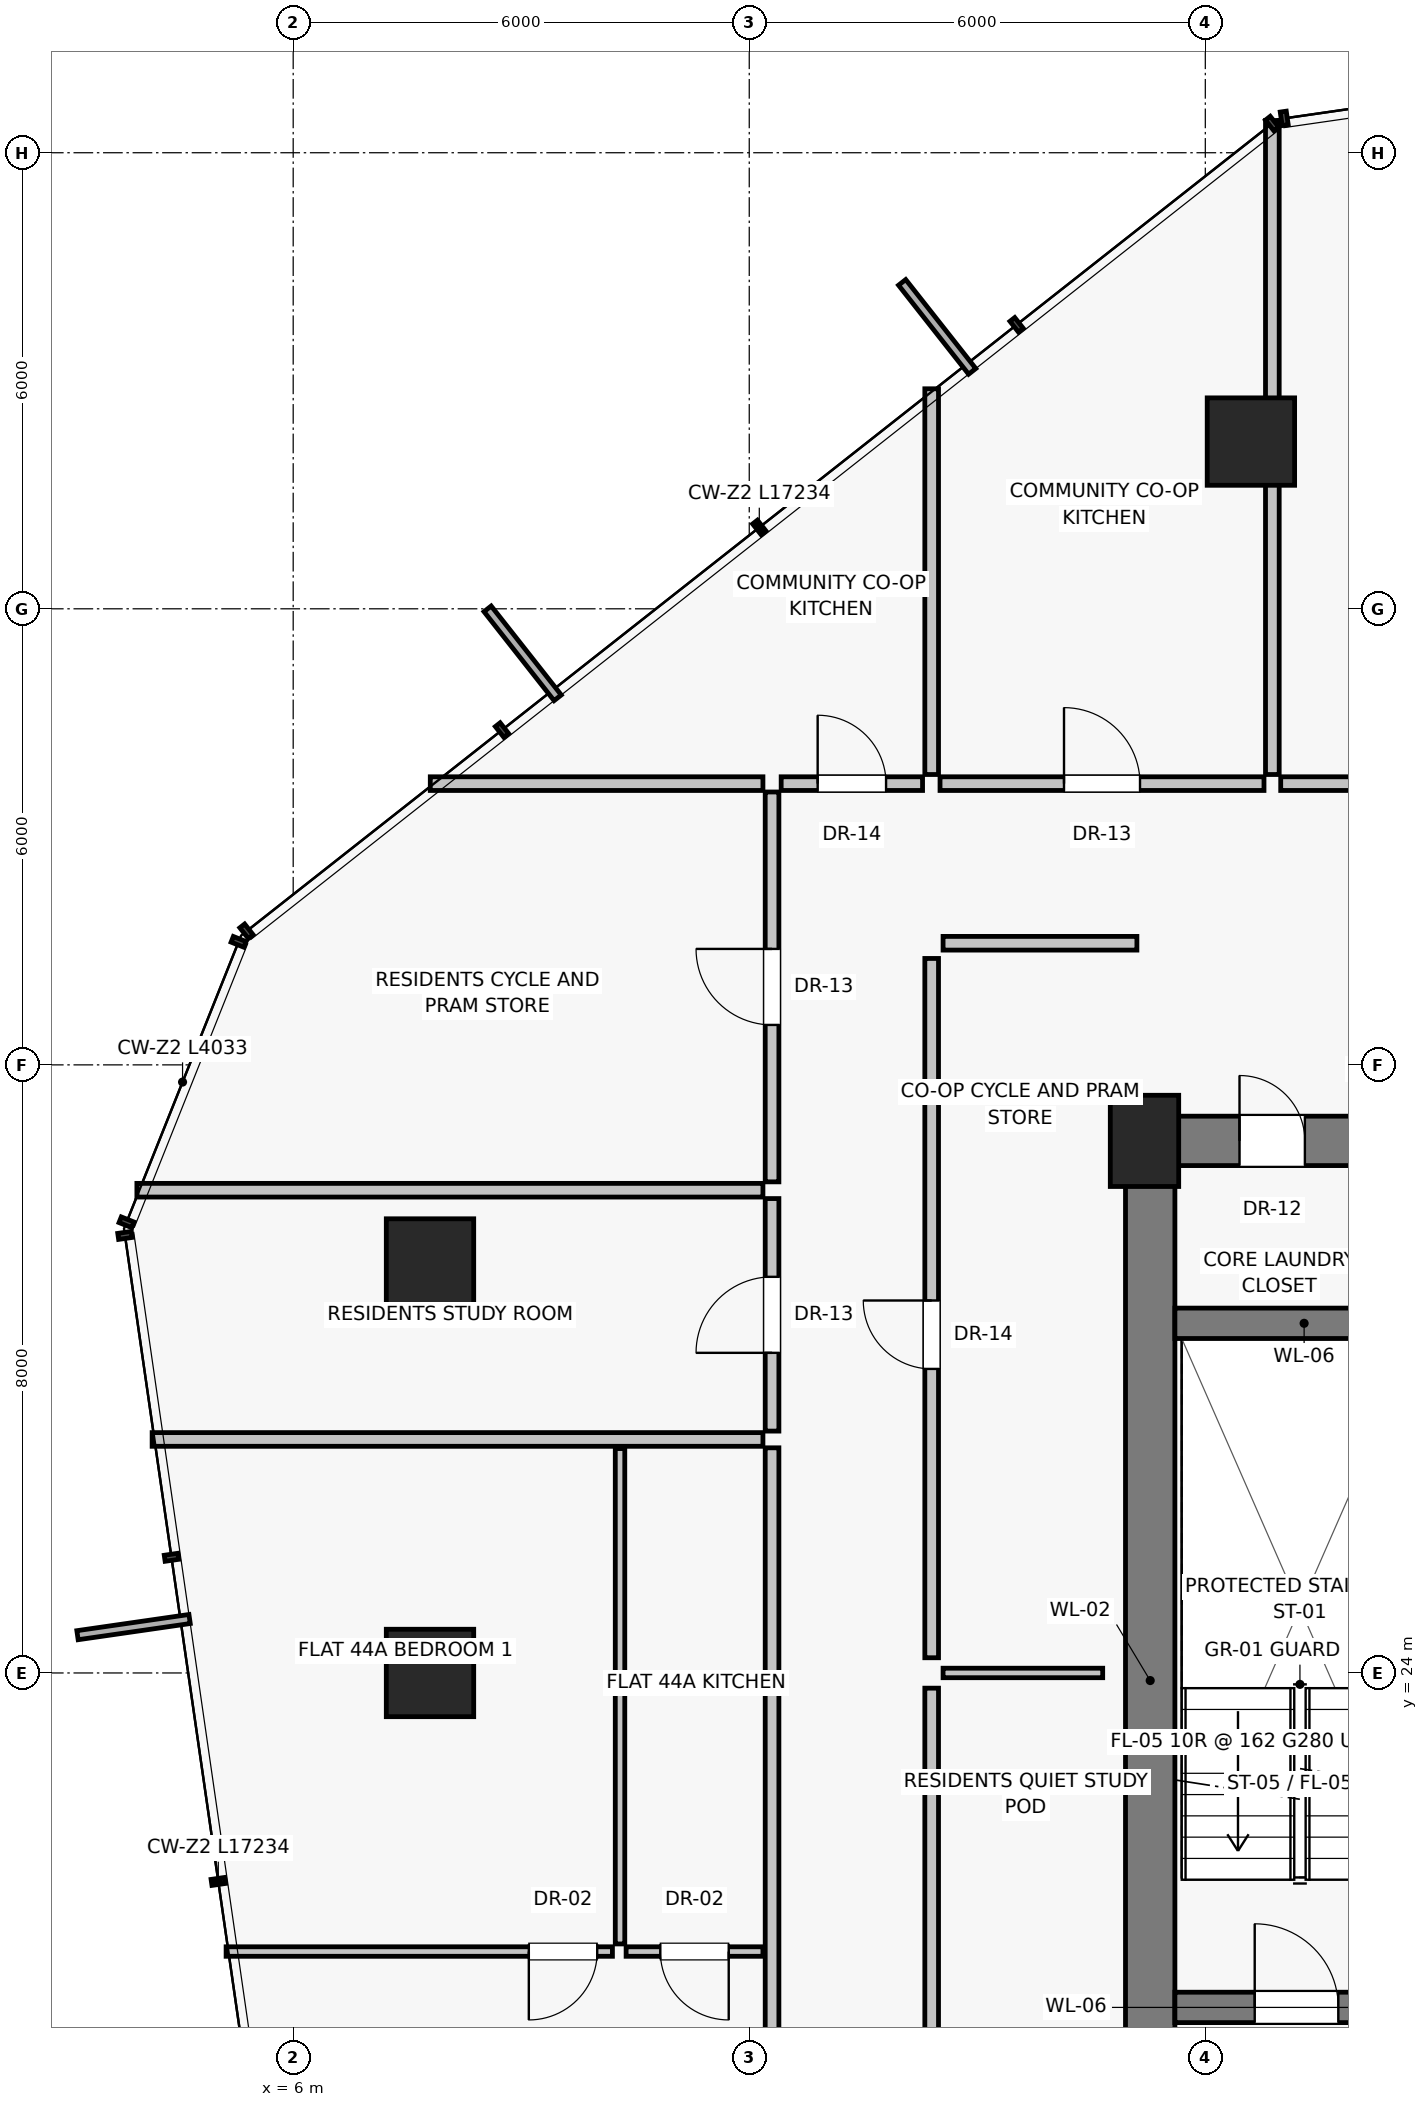
"""IFC4 building model, lengths in metres.
Left out: names, types, materials, properties, quantities, classifications, styles, units other than length and angle.
Written with IfcOpenShell. Run it as: python <this file> out.ifc"""

import sys

from ifc_helpers import new_model, si_unit, direction, frame, frame_2d, origin, origin_2d, place, context, subcontext, project, spatial, rectangle, extrude, source, transform, mapped, element, fill, save


model = new_model("IFC4")
c1 = context("Model", 3, precision=1e-05, world=origin(), true_north=direction((0.0, 1.0)))
c2 = subcontext(c1, "Body", "Model", "MODEL_VIEW")
j1 = project(units=[si_unit("LENGTHUNIT", "METRE"), si_unit("PLANEANGLEUNIT", "RADIAN")], contexts=[c1])
p1 = place(None, origin())
s1 = spatial("IfcSite", under=j1, at=p1, CompositionType="ELEMENT")
p2 = place(p1, origin())
s2 = spatial("IfcBuilding", under=s1, at=p2, CompositionType="ELEMENT")
p3 = place(p2, frame((0.0, 0.0, 155.5)))
s3 = spatial("IfcBuildingStorey", under=s2, at=p3, CompositionType="ELEMENT", Elevation=155.5)
p4 = place(p3, frame((17.2, 31.0, 0.0), z_axis=(0.0, 0.0, 1.0), x_axis=(1.0, 0.0, 0.0)))
e1 = element("IfcColumn", 1, at=p4, inside=s3, PredefinedType="PILASTER", context=c2, shape_type="SweptSolid", body=[
    extrude(rectangle(XDim=0.9, YDim=1.2, at=origin_2d()), origin(), (0.0, 0.0, 1.0), 3.25),
])
for number, where, z_axis, x_axis in (
    (2, (18.6, 40.2, 0.0), (0.0, 0.0, 1.0), (1.0, 0.0, 0.0)),
    (3, (7.8, 29.4, 0.0), (0.0, 0.0, 1.0), (1.0, 0.0, 0.0)),
    (4, (7.8, 24.0, 0.0), (0.0, 0.0, 1.0), (1.0, 0.0, 0.0)),
):
    element("IfcColumn", number, at=place(p3, frame(where, z_axis=z_axis, x_axis=x_axis)), inside=s3, PredefinedType="COLUMN", context=c2, shape_type="SweptSolid", body=[
        extrude(rectangle(XDim=1.15, YDim=1.15, at=origin_2d()), origin(), (0.0, 0.0, 1.0), 3.25),
    ])
p5 = place(p3, frame((17.275, 16.8, 0.0), z_axis=(0.0, 0.0, 1.0), x_axis=(0.0, 1.0, 0.0)))
e5 = element("IfcWall", 5, at=p5, inside=s3, PredefinedType="SHEAR", context=c2, shape_type="SweptSolid", body=[
    extrude(rectangle(XDim=14.2, YDim=0.65, at=frame_2d((7.1, 0.0))), origin(), (0.0, 0.0, 1.0), 2.97),
])
p6 = place(p3, frame((17.2, 31.0, 0.0), z_axis=(0.0, 0.0, 1.0), x_axis=(1.0, 0.0, 0.0)))
e6 = element("IfcWall", 6, at=p6, inside=s3, PredefinedType="SHEAR", context=c2, shape_type="SweptSolid", body=[
    extrude(rectangle(XDim=3.8, YDim=0.65, at=frame_2d((1.9, 0.0))), origin(), (0.0, 0.0, 1.0), 2.97),
])
p7 = place(p6, frame((1.25, 0.0, 0.0)))
e7 = element("IfcOpeningElement", 7, at=p7, cuts=e6, PredefinedType="OPENING", context=c2, shape_type="SweptSolid", body=[
    extrude(rectangle(XDim=0.86, YDim=2.01, at=frame_2d((0.43, 1.005))), frame((0.0, 0.335, 0.0), z_axis=(0.0, -1.0, 0.0), x_axis=(1.0, 0.0, 0.0)), (0.0, 0.0, 1.0), 0.67),
])
p8 = place(p3, frame((17.6, 19.6, 0.0), z_axis=(0.0, 0.0, 1.0), x_axis=(1.0, 0.0, 0.0)))
e8 = element("IfcWall", 8, at=p8, inside=s3, PredefinedType="SHEAR", context=c2, shape_type="SweptSolid", body=[
    extrude(rectangle(XDim=3.4, YDim=0.4, at=frame_2d((1.7, 0.0))), origin(), (0.0, 0.0, 1.0), 2.97),
])
p9 = place(p8, frame((1.05, 0.0, 0.0)))
e9 = element("IfcOpeningElement", 9, at=p9, cuts=e8, PredefinedType="OPENING", context=c2, shape_type="SweptSolid", body=[
    extrude(rectangle(XDim=1.1, YDim=2.03, at=frame_2d((0.55, 1.015))), frame((0.0, 0.21, 0.0), z_axis=(0.0, -1.0, 0.0), x_axis=(1.0, 0.0, 0.0)), (0.0, 0.0, 1.0), 0.42),
])
p10 = place(p3, frame((17.6, 28.6, 0.0), z_axis=(0.0, 0.0, 1.0), x_axis=(1.0, 0.0, 0.0)))
e10 = element("IfcWall", 10, at=p10, inside=s3, PredefinedType="SHEAR", context=c2, shape_type="SweptSolid", body=[
    extrude(rectangle(XDim=3.4, YDim=0.4, at=frame_2d((1.7, 0.0))), origin(), (0.0, 0.0, 1.0), 2.97),
])
p11 = place(p3, frame((14.4, 14.4, 0.0), z_axis=(0.0, 0.0, 1.0), x_axis=(0.0, 1.0, 0.0)))
e11 = element("IfcWall", 11, at=p11, inside=s3, PredefinedType="PARTITIONING", context=c2, shape_type="SweptSolid", body=[
    extrude(rectangle(XDim=9.4, YDim=0.18, at=frame_2d((4.7, 0.0))), origin(), (0.0, 0.0, 1.0), 2.97),
])
p12 = place(p11, frame((3.8, 0.0, 0.0)))
e12 = element("IfcOpeningElement", 12, at=p12, cuts=e11, PredefinedType="OPENING", context=c2, shape_type="SweptSolid", body=[
    extrude(rectangle(XDim=0.9, YDim=2.01, at=frame_2d((0.45, 1.005))), frame((0.0, 0.1, 0.0), z_axis=(0.0, -1.0, 0.0), x_axis=(1.0, 0.0, 0.0)), (0.0, 0.0, 1.0), 0.2),
])
p13 = place(p3, frame((14.4, 24.2, 0.0), z_axis=(0.0, 0.0, 1.0), x_axis=(0.0, 1.0, 0.0)))
e13 = element("IfcWall", 13, at=p13, inside=s3, PredefinedType="PARTITIONING", context=c2, shape_type="SweptSolid", body=[
    extrude(rectangle(XDim=9.2, YDim=0.18, at=frame_2d((4.6, 0.0))), origin(), (0.0, 0.0, 1.0), 2.97),
])
p14 = place(p13, frame((3.8, 0.0, 0.0)))
e14 = element("IfcOpeningElement", 14, at=p14, cuts=e13, PredefinedType="OPENING", context=c2, shape_type="SweptSolid", body=[
    extrude(rectangle(XDim=0.9, YDim=2.01, at=frame_2d((0.45, 1.005))), frame((0.0, 0.1, 0.0), z_axis=(0.0, -1.0, 0.0), x_axis=(1.0, 0.0, 0.0)), (0.0, 0.0, 1.0), 0.2),
])
p15 = place(p3, frame((14.55, 24.0, 0.0), z_axis=(0.0, 0.0, 1.0), x_axis=(1.0, 0.0, 0.0)))
e15 = element("IfcWall", 15, at=p15, inside=s3, PredefinedType="PARTITIONING", context=c2, shape_type="SweptSolid", body=[
    extrude(rectangle(XDim=2.1, YDim=0.125, at=frame_2d((1.05, 0.0))), origin(), (0.0, 0.0, 1.0), 2.97),
])
p16 = place(p3, frame((14.55, 33.6, 0.0), z_axis=(0.0, 0.0, 1.0), x_axis=(1.0, 0.0, 0.0)))
e16 = element("IfcWall", 16, at=p16, inside=s3, PredefinedType="PARTITIONING", context=c2, shape_type="SweptSolid", body=[
    extrude(rectangle(XDim=2.55, YDim=0.18, at=frame_2d((1.275, 0.0))), origin(), (0.0, 0.0, 1.0), 2.97),
])
p17 = place(p3, frame((14.4, 35.82, 0.0), z_axis=(0.0, 0.0, 1.0), x_axis=(0.0, 1.0, 0.0)))
e17 = element("IfcWall", 17, at=p17, inside=s3, PredefinedType="PARTITIONING", context=c2, shape_type="SweptSolid", body=[
    extrude(rectangle(XDim=5.074, YDim=0.18, at=frame_2d((2.537, 0.0))), origin(), (0.0, 0.0, 1.0), 2.97),
])
p18 = place(p3, frame((14.51, 35.7, 0.0), z_axis=(0.0, 0.0, 1.0), x_axis=(1.0, 0.0, 0.0)))
e18 = element("IfcWall", 18, at=p18, inside=s3, PredefinedType="PARTITIONING", context=c2, shape_type="SweptSolid", body=[
    extrude(rectangle(XDim=4.262, YDim=0.18, at=frame_2d((2.131, 0.0))), origin(), (0.0, 0.0, 1.0), 2.55),
])
p19 = place(p18, frame((1.631, 0.0, 0.0)))
e19 = element("IfcOpeningElement", 19, at=p19, cuts=e18, PredefinedType="OPENING", context=c2, shape_type="SweptSolid", body=[
    extrude(rectangle(XDim=1.0, YDim=2.01, at=frame_2d((0.5, 1.005))), frame((0.0, 0.1, 0.0), z_axis=(0.0, -1.0, 0.0), x_axis=(1.0, 0.0, 0.0)), (0.0, 0.0, 1.0), 0.2),
])
p20 = place(p3, frame((18.992, 35.7, 0.0), z_axis=(0.0, 0.0, 1.0), x_axis=(1.0, 0.0, 0.0)))
e20 = element("IfcWall", 20, at=p20, inside=s3, PredefinedType="PARTITIONING", context=c2, shape_type="SweptSolid", body=[
    extrude(rectangle(XDim=7.092, YDim=0.18, at=frame_2d((3.546, 0.0))), origin(), (0.0, 0.0, 1.0), 2.55),
])
p21 = place(p20, frame((3.046, 0.0, 0.0)))
e21 = element("IfcOpeningElement", 21, at=p21, cuts=e20, PredefinedType="OPENING", context=c2, shape_type="SweptSolid", body=[
    extrude(rectangle(XDim=1.0, YDim=2.01, at=frame_2d((0.5, 1.005))), frame((0.0, 0.1, 0.0), z_axis=(0.0, -1.0, 0.0), x_axis=(1.0, 0.0, 0.0)), (0.0, 0.0, 1.0), 0.2),
])
p22 = place(p3, frame((18.882, 35.82, 0.0), z_axis=(0.0, 0.0, 1.0), x_axis=(0.0, 1.0, 0.0)))
e22 = element("IfcWall", 22, at=p22, inside=s3, PredefinedType="PARTITIONING", context=c2, shape_type="SweptSolid", body=[
    extrude(rectangle(XDim=8.604, YDim=0.18, at=frame_2d((4.302, 0.0))), origin(), (0.0, 0.0, 1.0), 2.348),
])
p23 = place(p3, frame((12.18, 35.7, 0.0), z_axis=(0.0, 0.0, 1.0), x_axis=(-1.0, 0.0, 0.0)))
e23 = element("IfcWall", 23, at=p23, inside=s3, PredefinedType="PARTITIONING", context=c2, shape_type="SweptSolid", body=[
    extrude(rectangle(XDim=4.376, YDim=0.18, at=frame_2d((2.188, 0.0))), origin(), (0.0, 0.0, 1.0), 2.97),
])
p24 = place(p3, frame((12.3, 12.21, 0.0), z_axis=(0.0, 0.0, 1.0), x_axis=(0.0, 1.0, 0.0)))
e24 = element("IfcWall", 24, at=p24, inside=s3, PredefinedType="PARTITIONING", context=c2, shape_type="SweptSolid", body=[
    extrude(rectangle(XDim=14.752, YDim=0.18, at=frame_2d((7.376, 0.0))), origin(), (0.0, 0.0, 1.0), 2.55),
])
p25 = place(p24, frame((4.657, 0.0, 0.0)))
e25 = element("IfcOpeningElement", 25, at=p25, cuts=e24, PredefinedType="OPENING", context=c2, shape_type="SweptSolid", body=[
    extrude(rectangle(XDim=0.95, YDim=2.02, at=frame_2d((0.475, 1.01))), frame((0.0, 0.1, 0.0), z_axis=(0.0, -1.0, 0.0), x_axis=(1.0, 0.0, 0.0)), (0.0, 0.0, 1.0), 0.2),
])
p26 = place(p3, frame((12.18, 20.335, 0.0), z_axis=(0.0, 0.0, 1.0), x_axis=(-1.0, 0.0, 0.0)))
e26 = element("IfcWall", 26, at=p26, inside=s3, PredefinedType="PARTITIONING", context=c2, shape_type="SweptSolid", body=[
    extrude(rectangle(XDim=1.8, YDim=0.125, at=frame_2d((0.9, 0.0))), origin(), (0.0, 0.0, 1.0), 2.97),
])
p27 = place(p26, frame((0.45, 0.0, 0.0)))
e27 = element("IfcOpeningElement", 27, at=p27, cuts=e26, PredefinedType="OPENING", context=c2, shape_type="SweptSolid", body=[
    extrude(rectangle(XDim=0.9, YDim=2.01, at=frame_2d((0.45, 1.005))), frame((0.0, 0.073, 0.0), z_axis=(0.0, -1.0, 0.0), x_axis=(1.0, 0.0, 0.0)), (0.0, 0.0, 1.0), 0.145),
])
p28 = place(p3, frame((10.3, 20.435, 0.0), z_axis=(0.0, 0.0, 1.0), x_axis=(0.0, 1.0, 0.0)))
e28 = element("IfcWall", 28, at=p28, inside=s3, PredefinedType="PARTITIONING", context=c2, shape_type="SweptSolid", body=[
    extrude(rectangle(XDim=6.517, YDim=0.125, at=frame_2d((3.258, 0.0))), origin(), (0.0, 0.0, 1.0), 2.97),
])
p29 = place(p3, frame((10.2, 20.335, 0.0), z_axis=(0.0, 0.0, 1.0), x_axis=(-1.0, 0.0, 0.0)))
e29 = element("IfcWall", 29, at=p29, inside=s3, PredefinedType="PARTITIONING", context=c2, shape_type="SweptSolid", body=[
    extrude(rectangle(XDim=5.083, YDim=0.125, at=frame_2d((2.541, 0.0))), origin(), (0.0, 0.0, 1.0), 2.97),
])
p30 = place(p29, frame((0.2, 0.0, 0.0)))
e30 = element("IfcOpeningElement", 30, at=p30, cuts=e29, PredefinedType="OPENING", context=c2, shape_type="SweptSolid", body=[
    extrude(rectangle(XDim=0.9, YDim=2.01, at=frame_2d((0.45, 1.005))), frame((0.0, 0.073, 0.0), z_axis=(0.0, -1.0, 0.0), x_axis=(1.0, 0.0, 0.0)), (0.0, 0.0, 1.0), 0.145),
])
p31 = place(p3, frame((12.18, 27.072, 0.0), z_axis=(0.0, 0.0, 1.0), x_axis=(-1.0, 0.0, 0.0)))
e31 = element("IfcWall", 31, at=p31, inside=s3, PredefinedType="PARTITIONING", context=c2, shape_type="SweptSolid", body=[
    extrude(rectangle(XDim=8.036, YDim=0.18, at=frame_2d((4.018, 0.0))), origin(), (0.0, 0.0, 1.0), 2.97),
])
p32 = place(p3, frame((12.3, 27.182, 0.0), z_axis=(0.0, 0.0, 1.0), x_axis=(0.0, 1.0, 0.0)))
e32 = element("IfcWall", 32, at=p32, inside=s3, PredefinedType="PARTITIONING", context=c2, shape_type="SweptSolid", body=[
    extrude(rectangle(XDim=3.059, YDim=0.18, at=frame_2d((1.53, 0.0))), origin(), (0.0, 0.0, 1.0), 2.55),
])
p33 = place(p32, frame((1.03, 0.0, 0.0)))
e33 = element("IfcOpeningElement", 33, at=p33, cuts=e32, PredefinedType="OPENING", context=c2, shape_type="SweptSolid", body=[
    extrude(rectangle(XDim=1.0, YDim=2.01, at=frame_2d((0.5, 1.005))), frame((0.0, 0.1, 0.0), z_axis=(0.0, -1.0, 0.0), x_axis=(1.0, 0.0, 0.0)), (0.0, 0.0, 1.0), 0.2),
])
p34 = place(p3, frame((12.3, 30.461, 0.0), z_axis=(0.0, 0.0, 1.0), x_axis=(0.0, 1.0, 0.0)))
e34 = element("IfcWall", 34, at=p34, inside=s3, PredefinedType="PARTITIONING", context=c2, shape_type="SweptSolid", body=[
    extrude(rectangle(XDim=5.129, YDim=0.18, at=frame_2d((2.564, 0.0))), origin(), (0.0, 0.0, 1.0), 2.97),
])
p35 = place(p34, frame((2.064, 0.0, 0.0)))
e35 = element("IfcOpeningElement", 35, at=p35, cuts=e34, PredefinedType="OPENING", context=c2, shape_type="SweptSolid", body=[
    extrude(rectangle(XDim=1.0, YDim=2.01, at=frame_2d((0.5, 1.005))), frame((0.0, 0.1, 0.0), z_axis=(0.0, -1.0, 0.0), x_axis=(1.0, 0.0, 0.0)), (0.0, 0.0, 1.0), 0.2),
])
p36 = place(p3, frame((12.18, 30.351, 0.0), z_axis=(0.0, 0.0, 1.0), x_axis=(-1.0, 0.0, 0.0)))
e36 = element("IfcWall", 36, at=p36, inside=s3, PredefinedType="PARTITIONING", context=c2, shape_type="SweptSolid", body=[
    extrude(rectangle(XDim=8.236, YDim=0.18, at=frame_2d((4.118, 0.0))), origin(), (0.0, 0.0, 1.0), 2.348),
])
p37 = place(p3, frame((12.42, 35.7, 0.0), z_axis=(0.0, 0.0, 1.0), x_axis=(1.0, 0.0, 0.0)))
e37 = element("IfcWall", 37, at=p37, inside=s3, PredefinedType="PARTITIONING", context=c2, shape_type="SweptSolid", body=[
    extrude(rectangle(XDim=1.86, YDim=0.18, at=frame_2d((0.93, 0.0))), origin(), (0.0, 0.0, 1.0), 2.97),
])
p38 = place(p37, frame((0.48, 0.0, 0.0)))
e38 = element("IfcOpeningElement", 38, at=p38, cuts=e37, PredefinedType="OPENING", context=c2, shape_type="SweptSolid", body=[
    extrude(rectangle(XDim=0.9, YDim=2.01, at=frame_2d((0.45, 1.005))), frame((0.0, 0.1, 0.0), z_axis=(0.0, -1.0, 0.0), x_axis=(1.0, 0.0, 0.0)), (0.0, 0.0, 1.0), 0.2),
])
m1 = source(origin(), c2, "Body", "SweptSolid", [
    extrude(rectangle(XDim=0.86, YDim=2.01, at=frame_2d((0.43, 1.005))), frame((0.0, 0.025, 0.0), z_axis=(0.0, -1.0, 0.0), x_axis=(1.0, 0.0, 0.0)), (0.0, 0.0, 1.0), 0.05),
])
p39 = place(p7, origin())
e39 = element("IfcDoor", 39, at=p39, inside=s3, OperationType="SINGLE_SWING_LEFT", PredefinedType="DOOR", context=c2, shape_type="MappedRepresentation", body=[
    mapped(m1, transform((0.0, 0.0, 0.0), scale=1.0)),
])
fill(e7, e39)
m2 = source(origin(), c2, "Body", "SweptSolid", [
    extrude(rectangle(XDim=1.1, YDim=2.03, at=frame_2d((0.55, 1.015))), frame((0.0, 0.025, 0.0), z_axis=(0.0, -1.0, 0.0), x_axis=(1.0, 0.0, 0.0)), (0.0, 0.0, 1.0), 0.05),
])
p40 = place(p9, origin())
e40 = element("IfcDoor", 40, at=p40, inside=s3, OperationType="SINGLE_SWING_LEFT", PredefinedType="DOOR", context=c2, shape_type="MappedRepresentation", body=[
    mapped(m2, transform((0.0, 0.0, 0.0), scale=1.0)),
])
fill(e9, e40)
m3 = source(origin(), c2, "Body", "SweptSolid", [
    extrude(rectangle(XDim=0.9, YDim=2.01, at=frame_2d((0.45, 1.005))), frame((0.0, 0.025, 0.0), z_axis=(0.0, -1.0, 0.0), x_axis=(1.0, 0.0, 0.0)), (0.0, 0.0, 1.0), 0.05),
])
p41 = place(p14, origin())
e41 = element("IfcDoor", 41, at=p41, inside=s3, OperationType="SINGLE_SWING_RIGHT", PredefinedType="DOOR", context=c2, shape_type="MappedRepresentation", body=[
    mapped(m3, transform((0.0, 0.0, 0.0), scale=1.0)),
])
fill(e14, e41)
m4 = source(origin(), c2, "Body", "SweptSolid", [
    extrude(rectangle(XDim=1.0, YDim=2.01, at=frame_2d((0.5, 1.005))), frame((0.0, 0.025, 0.0), z_axis=(0.0, -1.0, 0.0), x_axis=(1.0, 0.0, 0.0)), (0.0, 0.0, 1.0), 0.05),
])
p42 = place(p19, origin())
e42 = element("IfcDoor", 42, at=p42, inside=s3, OperationType="SINGLE_SWING_LEFT", PredefinedType="DOOR", context=c2, shape_type="MappedRepresentation", body=[
    mapped(m4, transform((0.0, 0.0, 0.0), scale=1.0)),
])
fill(e19, e42)
p43 = place(p27, origin())
e43 = element("IfcDoor", 43, at=p43, inside=s3, OperationType="SINGLE_SWING_LEFT", PredefinedType="DOOR", context=c2, shape_type="MappedRepresentation", body=[
    mapped(m3, transform((0.0, 0.0, 0.0), scale=1.0)),
])
fill(e27, e43)
p44 = place(p30, origin())
e44 = element("IfcDoor", 44, at=p44, inside=s3, OperationType="SINGLE_SWING_RIGHT", PredefinedType="DOOR", context=c2, shape_type="MappedRepresentation", body=[
    mapped(m3, transform((0.0, 0.0, 0.0), scale=1.0)),
])
fill(e30, e44)
p45 = place(p33, origin())
e45 = element("IfcDoor", 45, at=p45, inside=s3, OperationType="SINGLE_SWING_LEFT", PredefinedType="DOOR", context=c2, shape_type="MappedRepresentation", body=[
    mapped(m4, transform((0.0, 0.0, 0.0), scale=1.0)),
])
fill(e33, e45)
p46 = place(p35, origin())
e46 = element("IfcDoor", 46, at=p46, inside=s3, OperationType="SINGLE_SWING_RIGHT", PredefinedType="DOOR", context=c2, shape_type="MappedRepresentation", body=[
    mapped(m4, transform((0.0, 0.0, 0.0), scale=1.0)),
])
fill(e35, e46)
p47 = place(p38, origin())
e47 = element("IfcDoor", 47, at=p47, inside=s3, OperationType="SINGLE_SWING_LEFT", PredefinedType="DOOR", context=c2, shape_type="MappedRepresentation", body=[
    mapped(m3, transform((0.0, 0.0, 0.0), scale=1.0)),
])
fill(e38, e47)
save(model, sys.argv[1])
